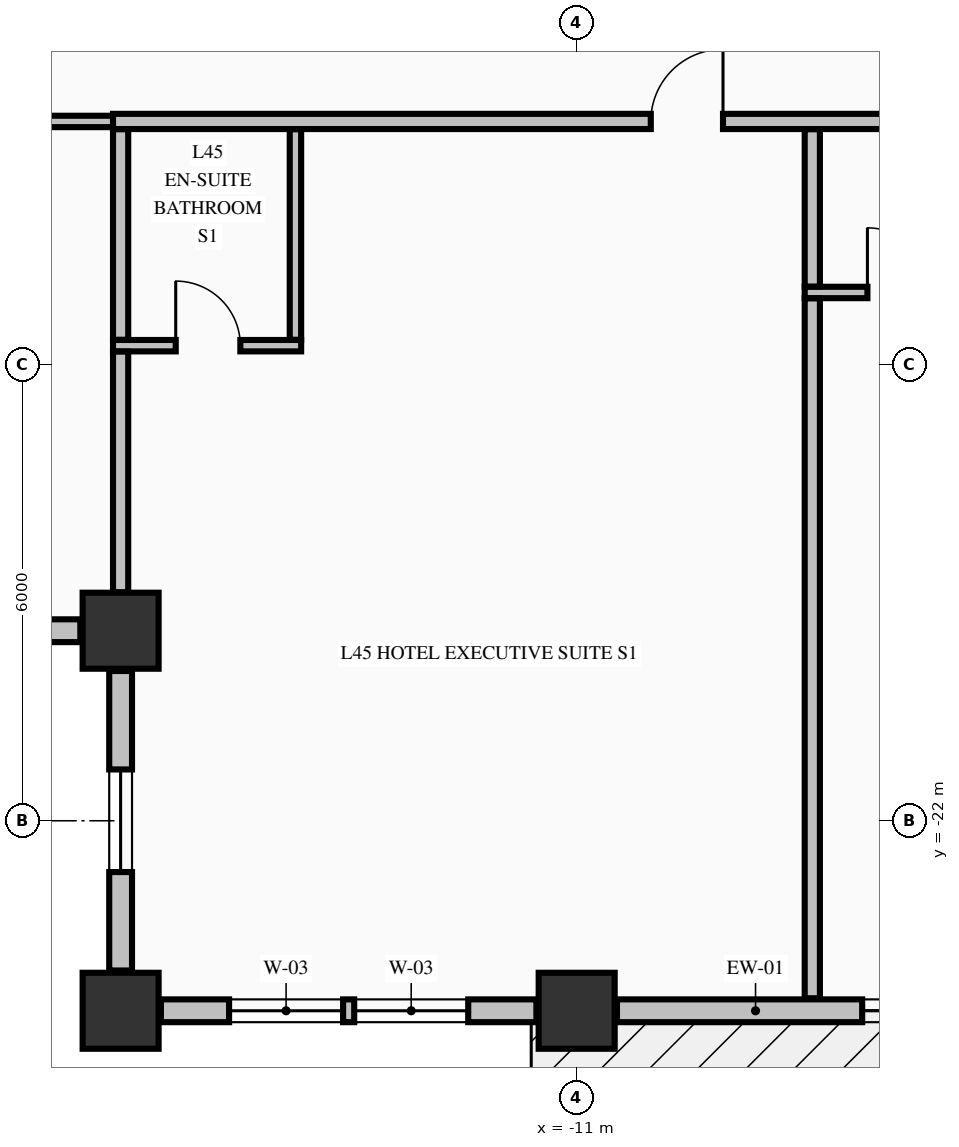
"""IFC4 building model, lengths in metres.
Left out: names, types, materials, properties, quantities, classifications, styles, units other than length and angle.
Written with IfcOpenShell. Run it as: python <this file> out.ifc"""

import sys

from ifc_helpers import new_model, si_unit, direction, frame, frame_2d, origin, origin_2d, place, context, subcontext, project, spatial, rectangle, extrude, element, fill, save


model = new_model("IFC4")
c1 = context("Model", 3, precision=1e-05, world=origin(), true_north=direction((0.0, 1.0)))
c2 = subcontext(c1, "Body", "Model", "MODEL_VIEW")
j1 = project(units=[si_unit("LENGTHUNIT", "METRE"), si_unit("PLANEANGLEUNIT", "RADIAN")], contexts=[c1])
p1 = place(None, origin())
s1 = spatial("IfcSite", under=j1, at=p1, CompositionType="ELEMENT")
p2 = place(p1, origin())
s2 = spatial("IfcBuilding", under=s1, at=p2, CompositionType="ELEMENT")
p3 = place(p2, frame((0.0, 0.0, 176.26)))
s3 = spatial("IfcBuildingStorey", under=s2, at=p3, CompositionType="ELEMENT", Elevation=176.26)
for number, where, z_axis, x_axis in (
    (1, (-17.0, -24.5, -0.275), (0.0, 0.0, 1.0), (1.0, 0.0, 0.0)),
    (2, (-11.0, -24.5, -0.275), (0.0, 0.0, 1.0), (1.0, 0.0, 0.0)),
    (3, (-17.0, -19.5, -0.275), (0.0, 0.0, 1.0), (1.0, 0.0, 0.0)),
):
    element("IfcColumn", number, at=place(p3, frame(where, z_axis=z_axis, x_axis=x_axis)), inside=s3, PredefinedType="COLUMN", context=c2, shape_type="SweptSolid", body=[
        extrude(rectangle(XDim=1.0, YDim=1.0, at=origin_2d()), origin(), (0.0, 0.0, 1.0), 3.425),
    ])
p4 = place(p3, frame((-21.47, -19.5, 0.0), z_axis=(0.0, 0.0, 1.0), x_axis=(1.0, 0.0, 0.0)))
e4 = element("IfcWall", 4, at=p4, inside=s3, PredefinedType="STANDARD", context=c2, shape_type="SweptSolid", body=[
    extrude(rectangle(XDim=3.94, YDim=0.3, at=frame_2d((1.97, 0.0))), origin(), (0.0, 0.0, 1.0), 2.542),
])
p5 = place(p4, frame((1.295, 0.0, 0.68)))
e5 = element("IfcOpeningElement", 5, at=p5, cuts=e4, PredefinedType="OPENING", context=c2, shape_type="SweptSolid", body=[
    extrude(rectangle(XDim=1.35, YDim=1.42, at=frame_2d((0.675, 0.71))), frame((0.0, 0.16, 0.0), z_axis=(0.0, -1.0, 0.0), x_axis=(1.0, 0.0, 0.0)), (0.0, 0.0, 1.0), 0.32),
])
p6 = place(p3, frame((-17.0, -20.03, 0.0), z_axis=(0.0, 0.0, 1.0), x_axis=(0.0, -1.0, 0.0)))
e6 = element("IfcWall", 6, at=p6, inside=s3, PredefinedType="STANDARD", context=c2, shape_type="SweptSolid", body=[
    extrude(rectangle(XDim=3.94, YDim=0.3, at=frame_2d((1.97, 0.0))), origin(), (0.0, 0.0, 1.0), 2.542),
])
p7 = place(p6, frame((1.295, 0.0, 0.68)))
e7 = element("IfcOpeningElement", 7, at=p7, cuts=e6, PredefinedType="OPENING", context=c2, shape_type="SweptSolid", body=[
    extrude(rectangle(XDim=1.35, YDim=1.42, at=frame_2d((0.675, 0.71))), frame((0.0, 0.16, 0.0), z_axis=(0.0, -1.0, 0.0), x_axis=(1.0, 0.0, 0.0)), (0.0, 0.0, 1.0), 0.32),
])
p8 = place(p3, frame((-16.47, -24.5, 0.0), z_axis=(0.0, 0.0, 1.0), x_axis=(1.0, 0.0, 0.0)))
e8 = element("IfcWall", 8, at=p8, inside=s3, PredefinedType="STANDARD", context=c2, shape_type="SweptSolid", body=[
    extrude(rectangle(XDim=4.94, YDim=0.3, at=frame_2d((2.47, 0.0))), origin(), (0.0, 0.0, 1.0), 2.542),
])
p9 = place(p8, frame((0.897, 0.0, 0.72)))
e9 = element("IfcOpeningElement", 9, at=p9, cuts=e8, PredefinedType="OPENING", context=c2, shape_type="SweptSolid", body=[
    extrude(rectangle(XDim=1.5, YDim=1.6, at=frame_2d((0.75, 0.8))), frame((0.0, 0.16, 0.0), z_axis=(0.0, -1.0, 0.0), x_axis=(1.0, 0.0, 0.0)), (0.0, 0.0, 1.0), 0.32),
])
p10 = place(p8, frame((2.543, 0.0, 0.72)))
e10 = element("IfcOpeningElement", 10, at=p10, cuts=e8, PredefinedType="OPENING", context=c2, shape_type="SweptSolid", body=[
    extrude(rectangle(XDim=1.5, YDim=1.6, at=frame_2d((0.75, 0.8))), frame((0.0, 0.16, 0.0), z_axis=(0.0, -1.0, 0.0), x_axis=(1.0, 0.0, 0.0)), (0.0, 0.0, 1.0), 0.32),
])
p11 = place(p3, frame((-10.47, -24.5, 0.0), z_axis=(0.0, 0.0, 1.0), x_axis=(1.0, 0.0, 0.0)))
e11 = element("IfcWall", 11, at=p11, inside=s3, PredefinedType="STANDARD", context=c2, shape_type="SweptSolid", body=[
    extrude(rectangle(XDim=9.94, YDim=0.3, at=frame_2d((4.97, 0.0))), origin(), (0.0, 0.0, 1.0), 2.542),
])
p12 = place(p11, frame((7.585, 0.0, 0.0)))
e12 = element("IfcOpeningElement", 12, at=p12, cuts=e11, PredefinedType="OPENING", context=c2, shape_type="SweptSolid", body=[
    extrude(rectangle(XDim=1.1, YDim=2.15, at=frame_2d((0.55, 1.075))), frame((0.0, 0.16, 0.0), z_axis=(0.0, -1.0, 0.0), x_axis=(1.0, 0.0, 0.0)), (0.0, 0.0, 1.0), 0.32),
])
p13 = place(p11, frame((3.226, 0.0, 0.72)))
e13 = element("IfcOpeningElement", 13, at=p13, cuts=e11, PredefinedType="OPENING", context=c2, shape_type="SweptSolid", body=[
    extrude(rectangle(XDim=1.5, YDim=1.6, at=frame_2d((0.75, 0.8))), frame((0.0, 0.16, 0.0), z_axis=(0.0, -1.0, 0.0), x_axis=(1.0, 0.0, 0.0)), (0.0, 0.0, 1.0), 0.32),
])
p14 = place(p11, frame((5.214, 0.0, 0.72)))
e14 = element("IfcOpeningElement", 14, at=p14, cuts=e11, PredefinedType="OPENING", context=c2, shape_type="SweptSolid", body=[
    extrude(rectangle(XDim=1.5, YDim=1.6, at=frame_2d((0.75, 0.8))), frame((0.0, 0.16, 0.0), z_axis=(0.0, -1.0, 0.0), x_axis=(1.0, 0.0, 0.0)), (0.0, 0.0, 1.0), 0.32),
])
p15 = place(p3, frame((-17.1, -15.75, 0.0), z_axis=(0.0, 0.0, 1.0), x_axis=(1.0, 0.0, 0.0)))
e15 = element("IfcWall", 15, at=p15, inside=s3, PredefinedType="PARTITIONING", context=c2, shape_type="SweptSolid", body=[
    extrude(rectangle(XDim=2.475, YDim=0.15, at=frame_2d((1.238, 0.0))), origin(), (0.0, 0.0, 1.0), 3.15),
])
p16 = place(p15, frame((0.825, 0.0, 0.0)))
e16 = element("IfcOpeningElement", 16, at=p16, cuts=e15, PredefinedType="OPENING", context=c2, shape_type="SweptSolid", body=[
    extrude(rectangle(XDim=0.85, YDim=2.1, at=frame_2d((0.425, 1.05))), frame((0.0, 0.085, 0.0), z_axis=(0.0, -1.0, 0.0), x_axis=(1.0, 0.0, 0.0)), (0.0, 0.0, 1.0), 0.17),
])
p17 = place(p3, frame((-8.0, -15.05, 0.0), z_axis=(0.0, 0.0, 1.0), x_axis=(1.0, 0.0, 0.0)))
e17 = element("IfcWall", 17, at=p17, inside=s3, PredefinedType="PARTITIONING", context=c2, shape_type="SweptSolid", body=[
    extrude(rectangle(XDim=2.475, YDim=0.15, at=frame_2d((1.238, 0.0))), origin(), (0.0, 0.0, 1.0), 3.15),
])
p18 = place(p17, frame((0.825, 0.0, 0.0)))
e18 = element("IfcOpeningElement", 18, at=p18, cuts=e17, PredefinedType="OPENING", context=c2, shape_type="SweptSolid", body=[
    extrude(rectangle(XDim=0.85, YDim=2.1, at=frame_2d((0.425, 1.05))), frame((0.0, 0.085, 0.0), z_axis=(0.0, -1.0, 0.0), x_axis=(1.0, 0.0, 0.0)), (0.0, 0.0, 1.0), 0.17),
])
p19 = place(p3, frame((-20.075, -12.8, 0.0), z_axis=(0.0, 0.0, 1.0), x_axis=(1.0, 0.0, 0.0)))
e19 = element("IfcWall", 19, at=p19, inside=s3, PredefinedType="PARTITIONING", context=c2, shape_type="SweptSolid", body=[
    extrude(rectangle(XDim=3.175, YDim=0.15, at=frame_2d((1.587, 0.0))), origin(), (0.0, 0.0, 1.0), 3.15),
])
p20 = place(p3, frame((-17.1, -12.8, 0.0), z_axis=(0.0, 0.0, 1.0), x_axis=(1.0, 0.0, 0.0)))
e20 = element("IfcWall", 20, at=p20, inside=s3, PredefinedType="PARTITIONING", context=c2, shape_type="SweptSolid", body=[
    extrude(rectangle(XDim=39.2, YDim=0.2, at=frame_2d((19.6, 0.0))), origin(), (0.0, 0.0, 1.0), 3.15),
])
p21 = place(p20, frame((7.075, 0.0, 0.0)))
e21 = element("IfcOpeningElement", 21, at=p21, cuts=e20, PredefinedType="OPENING", context=c2, shape_type="SweptSolid", body=[
    extrude(rectangle(XDim=0.95, YDim=2.15, at=frame_2d((0.475, 1.075))), frame((0.0, 0.11, 0.0), z_axis=(0.0, -1.0, 0.0), x_axis=(1.0, 0.0, 0.0)), (0.0, 0.0, 1.0), 0.22),
])
p22 = place(p20, frame((18.075, 0.0, 0.0)))
e22 = element("IfcOpeningElement", 22, at=p22, cuts=e20, PredefinedType="OPENING", context=c2, shape_type="SweptSolid", body=[
    extrude(rectangle(XDim=0.95, YDim=2.15, at=frame_2d((0.475, 1.075))), frame((0.0, 0.11, 0.0), z_axis=(0.0, -1.0, 0.0), x_axis=(1.0, 0.0, 0.0)), (0.0, 0.0, 1.0), 0.22),
])
p23 = place(p20, frame((25.605, 0.0, 0.0)))
e23 = element("IfcOpeningElement", 23, at=p23, cuts=e20, PredefinedType="OPENING", context=c2, shape_type="SweptSolid", body=[
    extrude(rectangle(XDim=0.95, YDim=2.15, at=frame_2d((0.475, 1.075))), frame((0.0, 0.11, 0.0), z_axis=(0.0, -1.0, 0.0), x_axis=(1.0, 0.0, 0.0)), (0.0, 0.0, 1.0), 0.22),
])
p24 = place(p20, frame((32.755, 0.0, 0.0)))
e24 = element("IfcOpeningElement", 24, at=p24, cuts=e20, PredefinedType="OPENING", context=c2, shape_type="SweptSolid", body=[
    extrude(rectangle(XDim=1.05, YDim=2.15, at=frame_2d((0.525, 1.075))), frame((0.0, 0.11, 0.0), z_axis=(0.0, -1.0, 0.0), x_axis=(1.0, 0.0, 0.0)), (0.0, 0.0, 1.0), 0.22),
])
p25 = place(p3, frame((-17.0, -18.994, 0.0), z_axis=(0.0, 0.0, 1.0), x_axis=(0.0, 1.0, 0.0)))
e25 = element("IfcWall", 25, at=p25, inside=s3, PredefinedType="PARTITIONING", context=c2, shape_type="SweptSolid", body=[
    extrude(rectangle(XDim=3.166, YDim=0.2, at=frame_2d((1.583, 0.0))), origin(), (0.0, 0.0, 1.0), 3.15),
])
p26 = place(p3, frame((-17.0, -15.672, 0.0), z_axis=(0.0, 0.0, 1.0), x_axis=(0.0, 1.0, 0.0)))
e26 = element("IfcWall", 26, at=p26, inside=s3, PredefinedType="PARTITIONING", context=c2, shape_type="SweptSolid", body=[
    extrude(rectangle(XDim=2.769, YDim=0.2, at=frame_2d((1.385, 0.0))), origin(), (0.0, 0.0, 1.0), 3.15),
])
p27 = place(p3, frame((-14.7, -15.672, 0.0), z_axis=(0.0, 0.0, 1.0), x_axis=(0.0, 1.0, 0.0)))
e27 = element("IfcWall", 27, at=p27, inside=s3, PredefinedType="PARTITIONING", context=c2, shape_type="SweptSolid", body=[
    extrude(rectangle(XDim=2.769, YDim=0.15, at=frame_2d((1.385, 0.0))), origin(), (0.0, 0.0, 1.0), 3.15),
])
p28 = place(p3, frame((-7.9, -24.335, 0.0), z_axis=(0.0, 0.0, 1.0), x_axis=(0.0, 1.0, 0.0)))
e28 = element("IfcWall", 28, at=p28, inside=s3, PredefinedType="PARTITIONING", context=c2, shape_type="SweptSolid", body=[
    extrude(rectangle(XDim=9.207, YDim=0.2, at=frame_2d((4.604, 0.0))), origin(), (0.0, 0.0, 1.0), 3.15),
])
p29 = place(p3, frame((-7.9, -14.972, 0.0), z_axis=(0.0, 0.0, 1.0), x_axis=(0.0, 1.0, 0.0)))
e29 = element("IfcWall", 29, at=p29, inside=s3, PredefinedType="PARTITIONING", context=c2, shape_type="SweptSolid", body=[
    extrude(rectangle(XDim=2.069, YDim=0.2, at=frame_2d((1.034, 0.0))), origin(), (0.0, 0.0, 1.0), 3.15),
])
p30 = place(p7, origin())
e30 = element("IfcWindow", 30, at=p30, inside=s3, PartitioningType="SINGLE_PANEL", PredefinedType="WINDOW", context=c2, shape_type="SweptSolid", body=[
    extrude(rectangle(XDim=1.35, YDim=1.42, at=frame_2d((0.675, 0.71))), frame((0.0, 0.03, 0.0), z_axis=(0.0, -1.0, 0.0), x_axis=(1.0, 0.0, 0.0)), (0.0, 0.0, 1.0), 0.06),
])
fill(e7, e30)
p31 = place(p9, origin())
e31 = element("IfcWindow", 31, at=p31, inside=s3, PartitioningType="SINGLE_PANEL", PredefinedType="WINDOW", context=c2, shape_type="SweptSolid", body=[
    extrude(rectangle(XDim=1.5, YDim=1.6, at=frame_2d((0.75, 0.8))), frame((0.0, 0.03, 0.0), z_axis=(0.0, -1.0, 0.0), x_axis=(1.0, 0.0, 0.0)), (0.0, 0.0, 1.0), 0.06),
])
fill(e9, e31)
p32 = place(p10, origin())
e32 = element("IfcWindow", 32, at=p32, inside=s3, PartitioningType="SINGLE_PANEL", PredefinedType="WINDOW", context=c2, shape_type="SweptSolid", body=[
    extrude(rectangle(XDim=1.5, YDim=1.6, at=frame_2d((0.75, 0.8))), frame((0.0, 0.03, 0.0), z_axis=(0.0, -1.0, 0.0), x_axis=(1.0, 0.0, 0.0)), (0.0, 0.0, 1.0), 0.06),
])
fill(e10, e32)
p33 = place(p13, origin())
e33 = element("IfcWindow", 33, at=p33, inside=s3, PartitioningType="SINGLE_PANEL", PredefinedType="WINDOW", context=c2, shape_type="SweptSolid", body=[
    extrude(rectangle(XDim=1.5, YDim=1.6, at=frame_2d((0.75, 0.8))), frame((0.0, 0.03, 0.0), z_axis=(0.0, -1.0, 0.0), x_axis=(1.0, 0.0, 0.0)), (0.0, 0.0, 1.0), 0.06),
])
fill(e13, e33)
p34 = place(p21, origin())
e34 = element("IfcDoor", 34, at=p34, inside=s3, OperationType="SINGLE_SWING_RIGHT", PredefinedType="DOOR", context=c2, shape_type="SweptSolid", body=[
    extrude(rectangle(XDim=0.95, YDim=2.15, at=frame_2d((0.475, 1.075))), frame((0.0, 0.025, 0.0), z_axis=(0.0, -1.0, 0.0), x_axis=(1.0, 0.0, 0.0)), (0.0, 0.0, 1.0), 0.05),
])
fill(e21, e34)
p35 = place(p16, origin())
e35 = element("IfcDoor", 35, at=p35, inside=s3, OperationType="SINGLE_SWING_LEFT", PredefinedType="DOOR", context=c2, shape_type="SweptSolid", body=[
    extrude(rectangle(XDim=0.85, YDim=2.1, at=frame_2d((0.425, 1.05))), frame((0.0, 0.025, 0.0), z_axis=(0.0, -1.0, 0.0), x_axis=(1.0, 0.0, 0.0)), (0.0, 0.0, 1.0), 0.05),
])
fill(e16, e35)
p36 = place(p18, origin())
e36 = element("IfcDoor", 36, at=p36, inside=s3, OperationType="SINGLE_SWING_LEFT", PredefinedType="DOOR", context=c2, shape_type="SweptSolid", body=[
    extrude(rectangle(XDim=0.85, YDim=2.1, at=frame_2d((0.425, 1.05))), frame((0.0, 0.025, 0.0), z_axis=(0.0, -1.0, 0.0), x_axis=(1.0, 0.0, 0.0)), (0.0, 0.0, 1.0), 0.05),
])
fill(e18, e36)
save(model, sys.argv[1])
